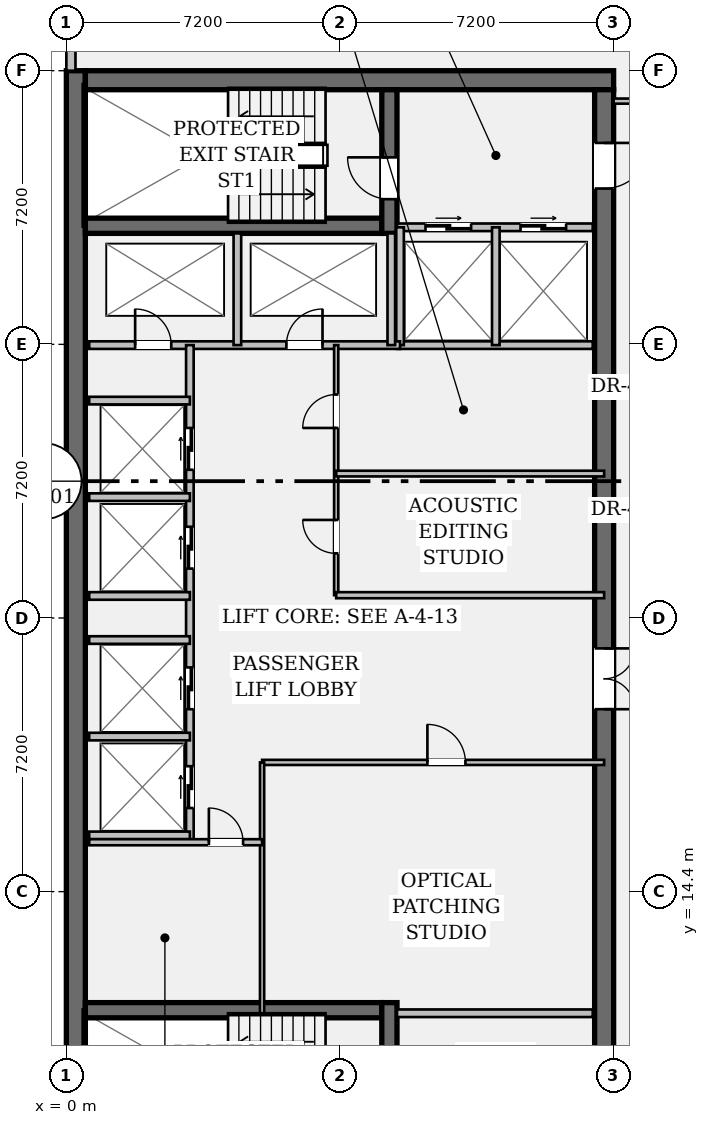
"""IFC4 building model, lengths in metres.
Left out: names, types, materials, properties, quantities, classifications, styles, units other than length and angle.
Written with IfcOpenShell. Run it as: python <this file> out.ifc"""

import sys

from ifc_helpers import new_model, si_unit, direction, frame, frame_2d, origin, place, context, subcontext, project, spatial, rectangle, extrude, element, fill, save


model = new_model("IFC4")
c1 = context("Model", 3, precision=1e-05, world=origin(), true_north=direction((0.0, 1.0)))
c2 = subcontext(c1, "Body", "Model", "MODEL_VIEW")
j1 = project(units=[si_unit("LENGTHUNIT", "METRE"), si_unit("PLANEANGLEUNIT", "RADIAN")], contexts=[c1])
p1 = place(None, origin())
s1 = spatial("IfcSite", under=j1, at=p1, CompositionType="ELEMENT")
p2 = place(p1, origin())
s2 = spatial("IfcBuilding", under=s1, at=p2, CompositionType="ELEMENT")
p3 = place(p2, frame((0.0, 0.0, 283.15)))
s3 = spatial("IfcBuildingStorey", under=s2, at=p3, CompositionType="ELEMENT", Elevation=283.15)
p4 = place(p3, frame((0.25, 7.2, 0.0), z_axis=(0.0, 0.0, 1.0), x_axis=(0.0, 1.0, 0.0)))
e1 = element("IfcWall", 1, at=p4, inside=s3, PredefinedType="SHEAR", context=c2, shape_type="SweptSolid", body=[
    extrude(rectangle(XDim=28.8, YDim=0.5, at=frame_2d((14.4, 0.0))), origin(), (0.0, 0.0, 1.0), 3.24),
])
p5 = place(p3, frame((0.5, 35.75, 0.0), z_axis=(0.0, 0.0, 1.0), x_axis=(1.0, 0.0, 0.0)))
e2 = element("IfcWall", 2, at=p5, inside=s3, PredefinedType="SHEAR", context=c2, shape_type="SweptSolid", body=[
    extrude(rectangle(XDim=13.9, YDim=0.5, at=frame_2d((6.95, 0.0))), origin(), (0.0, 0.0, 1.0), 3.24),
])
p6 = place(p3, frame((14.15, 35.5, 0.0), z_axis=(0.0, 0.0, 1.0), x_axis=(0.0, -1.0, 0.0)))
e3 = element("IfcWall", 3, at=p6, inside=s3, PredefinedType="SHEAR", context=c2, shape_type="SweptSolid", body=[
    extrude(rectangle(XDim=27.8, YDim=0.5, at=frame_2d((13.9, 0.0))), origin(), (0.0, 0.0, 1.0), 3.24),
])
p7 = place(p6, frame((1.4, 0.0, 0.0)))
e4 = element("IfcOpeningElement", 4, at=p7, cuts=e3, PredefinedType="OPENING", context=c2, shape_type="SweptSolid", body=[
    extrude(rectangle(XDim=1.2, YDim=2.15, at=frame_2d((0.6, 1.075))), frame((0.0, 0.262, 0.0), z_axis=(0.0, -1.0, 0.0), x_axis=(1.0, 0.0, 0.0)), (0.0, 0.0, 1.0), 0.524),
])
p8 = place(p6, frame((25.35, 0.0, 0.0)))
e5 = element("IfcOpeningElement", 5, at=p8, cuts=e3, PredefinedType="OPENING", context=c2, shape_type="SweptSolid", body=[
    extrude(rectangle(XDim=1.2, YDim=2.15, at=frame_2d((0.6, 1.075))), frame((0.0, 0.262, 0.0), z_axis=(0.0, -1.0, 0.0), x_axis=(1.0, 0.0, 0.0)), (0.0, 0.0, 1.0), 0.524),
])
p9 = place(p6, frame((14.7, 0.0, 0.0)))
e6 = element("IfcOpeningElement", 6, at=p9, cuts=e3, PredefinedType="OPENING", context=c2, shape_type="SweptSolid", body=[
    extrude(rectangle(XDim=1.6, YDim=2.2, at=frame_2d((0.8, 1.1))), frame((0.0, 0.262, 0.0), z_axis=(0.0, -1.0, 0.0), x_axis=(1.0, 0.0, 0.0)), (0.0, 0.0, 1.0), 0.524),
])
for number, where, z_axis, x_axis in (
    (7, (0.5, 31.92, 0.0), (0.0, 0.0, 1.0), (1.0, 0.0, 0.0)),
    (8, (0.5, 11.28, 0.0), (0.0, 0.0, 1.0), (1.0, 0.0, 0.0)),
):
    element("IfcWall", number, at=place(p3, frame(where, z_axis=z_axis, x_axis=x_axis)), inside=s3, PredefinedType="SHEAR", context=c2, shape_type="SweptSolid", body=[
        extrude(rectangle(XDim=7.8, YDim=0.4, at=frame_2d((3.9, 0.0))), origin(), (0.0, 0.0, 1.0), 3.24),
    ])
p10 = place(p3, frame((8.5, 31.72, 0.0), z_axis=(0.0, 0.0, 1.0), x_axis=(0.0, 1.0, 0.0)))
e9 = element("IfcWall", 9, at=p10, inside=s3, PredefinedType="SHEAR", context=c2, shape_type="SweptSolid", body=[
    extrude(rectangle(XDim=3.78, YDim=0.4, at=frame_2d((1.89, 0.0))), origin(), (0.0, 0.0, 1.0), 3.24),
])
p11 = place(p10, frame((0.9, 0.0, 0.0)))
e10 = element("IfcOpeningElement", 10, at=p11, cuts=e9, PredefinedType="OPENING", context=c2, shape_type="SweptSolid", body=[
    extrude(rectangle(XDim=1.1, YDim=2.15, at=frame_2d((0.55, 1.075))), frame((0.0, 0.212, 0.0), z_axis=(0.0, -1.0, 0.0), x_axis=(1.0, 0.0, 0.0)), (0.0, 0.0, 1.0), 0.424),
])
p12 = place(p3, frame((8.5, 7.7, 0.0), z_axis=(0.0, 0.0, 1.0), x_axis=(0.0, 1.0, 0.0)))
e11 = element("IfcWall", 11, at=p12, inside=s3, PredefinedType="SHEAR", context=c2, shape_type="SweptSolid", body=[
    extrude(rectangle(XDim=3.78, YDim=0.4, at=frame_2d((1.89, 0.0))), origin(), (0.0, 0.0, 1.0), 3.24),
])
p13 = place(p12, frame((0.85, 0.0, 0.0)))
e12 = element("IfcOpeningElement", 12, at=p13, cuts=e11, PredefinedType="OPENING", context=c2, shape_type="SweptSolid", body=[
    extrude(rectangle(XDim=1.1, YDim=2.15, at=frame_2d((0.55, 1.075))), frame((0.0, 0.212, 0.0), z_axis=(0.0, -1.0, 0.0), x_axis=(1.0, 0.0, 0.0)), (0.0, 0.0, 1.0), 0.424),
])
p14 = place(p3, frame((0.12, 36.0, 0.0), z_axis=(0.0, 0.0, 1.0), x_axis=(0.0, 1.0, 0.0)))
e13 = element("IfcWall", 13, at=p14, inside=s3, PredefinedType="STANDARD", context=c2, shape_type="SweptSolid", body=[
    extrude(rectangle(XDim=1.21, YDim=0.24, at=frame_2d((0.605, 0.0))), origin(), (0.0, 0.0, 1.0), 3.24),
])
p15 = place(p3, frame((8.7, 31.88, 0.0), z_axis=(0.0, 0.0, 1.0), x_axis=(1.0, 0.0, 0.0)))
e14 = element("IfcWall", 14, at=p15, inside=s3, PredefinedType="PARTITIONING", context=c2, shape_type="SweptSolid", body=[
    extrude(rectangle(XDim=5.15, YDim=0.2, at=frame_2d((2.575, 0.0))), origin(), (0.0, 0.0, 1.0), 3.24),
])
p16 = place(p15, frame((0.75, 0.0, 0.0)))
e15 = element("IfcOpeningElement", 15, at=p16, cuts=e14, PredefinedType="OPENING", context=c2, shape_type="SweptSolid", body=[
    extrude(rectangle(XDim=1.2, YDim=2.2, at=frame_2d((0.6, 1.1))), frame((0.0, 0.112, 0.0), z_axis=(0.0, -1.0, 0.0), x_axis=(1.0, 0.0, 0.0)), (0.0, 0.0, 1.0), 0.224),
])
p17 = place(p15, frame((3.25, 0.0, 0.0)))
e16 = element("IfcOpeningElement", 16, at=p17, cuts=e14, PredefinedType="OPENING", context=c2, shape_type="SweptSolid", body=[
    extrude(rectangle(XDim=1.2, YDim=2.2, at=frame_2d((0.6, 1.1))), frame((0.0, 0.112, 0.0), z_axis=(0.0, -1.0, 0.0), x_axis=(1.0, 0.0, 0.0)), (0.0, 0.0, 1.0), 0.224),
])
for number, where, z_axis, x_axis in (
    (17, (8.7, 11.2, 0.0), (0.0, 0.0, 1.0), (1.0, 0.0, 0.0)),
    (18, (8.7, 28.78, 0.0), (0.0, 0.0, 1.0), (1.0, 0.0, 0.0)),
):
    element("IfcWall", number, at=place(p3, frame(where, z_axis=z_axis, x_axis=x_axis)), inside=s3, PredefinedType="PARTITIONING", context=c2, shape_type="SweptSolid", body=[
        extrude(rectangle(XDim=5.15, YDim=0.2, at=frame_2d((2.575, 0.0))), origin(), (0.0, 0.0, 1.0), 3.24),
    ])
for number, where, z_axis, x_axis in (
    (19, (8.78, 28.78, 0.0), (0.0, 0.0, 1.0), (0.0, 1.0, 0.0)),
    (20, (11.3, 28.78, 0.0), (0.0, 0.0, 1.0), (0.0, 1.0, 0.0)),
):
    element("IfcWall", number, at=place(p3, frame(where, z_axis=z_axis, x_axis=x_axis)), inside=s3, PredefinedType="PARTITIONING", context=c2, shape_type="SweptSolid", body=[
        extrude(rectangle(XDim=3.1, YDim=0.2, at=frame_2d((1.55, 0.0))), origin(), (0.0, 0.0, 1.0), 3.24),
    ])
p18 = place(p3, frame((0.6, 28.78, 0.0), z_axis=(0.0, 0.0, 1.0), x_axis=(1.0, 0.0, 0.0)))
e21 = element("IfcWall", 21, at=p18, inside=s3, PredefinedType="PARTITIONING", context=c2, shape_type="SweptSolid", body=[
    extrude(rectangle(XDim=8.18, YDim=0.2, at=frame_2d((4.09, 0.0))), origin(), (0.0, 0.0, 1.0), 3.24),
])
p19 = place(p18, frame((1.21, 0.0, 0.0)))
e22 = element("IfcOpeningElement", 22, at=p19, cuts=e21, PredefinedType="OPENING", context=c2, shape_type="SweptSolid", body=[
    extrude(rectangle(XDim=0.95, YDim=2.15, at=frame_2d((0.475, 1.075))), frame((0.0, 0.112, 0.0), z_axis=(0.0, -1.0, 0.0), x_axis=(1.0, 0.0, 0.0)), (0.0, 0.0, 1.0), 0.224),
])
p20 = place(p18, frame((5.19, 0.0, 0.0)))
e23 = element("IfcOpeningElement", 23, at=p20, cuts=e21, PredefinedType="OPENING", context=c2, shape_type="SweptSolid", body=[
    extrude(rectangle(XDim=0.95, YDim=2.15, at=frame_2d((0.475, 1.075))), frame((0.0, 0.112, 0.0), z_axis=(0.0, -1.0, 0.0), x_axis=(1.0, 0.0, 0.0)), (0.0, 0.0, 1.0), 0.224),
])
for number, where, z_axis, x_axis in (
    (24, (4.5, 28.78, 0.0), (0.0, 0.0, 1.0), (0.0, 1.0, 0.0)),
    (25, (8.55, 28.78, 0.0), (0.0, 0.0, 1.0), (0.0, 1.0, 0.0)),
):
    element("IfcWall", number, at=place(p3, frame(where, z_axis=z_axis, x_axis=x_axis)), inside=s3, PredefinedType="PARTITIONING", context=c2, shape_type="SweptSolid", body=[
        extrude(rectangle(XDim=2.94, YDim=0.2, at=frame_2d((1.47, 0.0))), origin(), (0.0, 0.0, 1.0), 3.24),
    ])
p21 = place(p3, frame((3.25, 15.7, 0.0), z_axis=(0.0, 0.0, 1.0), x_axis=(0.0, 1.0, 0.0)))
e26 = element("IfcWall", 26, at=p21, inside=s3, PredefinedType="PARTITIONING", context=c2, shape_type="SweptSolid", body=[
    extrude(rectangle(XDim=13.08, YDim=0.2, at=frame_2d((6.54, 0.0))), origin(), (0.0, 0.0, 1.0), 3.24),
])
p22 = place(p21, frame((0.9, 0.0, 0.0)))
e27 = element("IfcOpeningElement", 27, at=p22, cuts=e26, PredefinedType="OPENING", context=c2, shape_type="SweptSolid", body=[
    extrude(rectangle(XDim=1.1, YDim=2.2, at=frame_2d((0.55, 1.1))), frame((0.0, 0.112, 0.0), z_axis=(0.0, -1.0, 0.0), x_axis=(1.0, 0.0, 0.0)), (0.0, 0.0, 1.0), 0.224),
])
p23 = place(p21, frame((3.5, 0.0, 0.0)))
e28 = element("IfcOpeningElement", 28, at=p23, cuts=e26, PredefinedType="OPENING", context=c2, shape_type="SweptSolid", body=[
    extrude(rectangle(XDim=1.1, YDim=2.2, at=frame_2d((0.55, 1.1))), frame((0.0, 0.112, 0.0), z_axis=(0.0, -1.0, 0.0), x_axis=(1.0, 0.0, 0.0)), (0.0, 0.0, 1.0), 0.224),
])
p24 = place(p21, frame((7.2, 0.0, 0.0)))
e29 = element("IfcOpeningElement", 29, at=p24, cuts=e26, PredefinedType="OPENING", context=c2, shape_type="SweptSolid", body=[
    extrude(rectangle(XDim=1.1, YDim=2.2, at=frame_2d((0.55, 1.1))), frame((0.0, 0.112, 0.0), z_axis=(0.0, -1.0, 0.0), x_axis=(1.0, 0.0, 0.0)), (0.0, 0.0, 1.0), 0.224),
])
p25 = place(p21, frame((9.8, 0.0, 0.0)))
e30 = element("IfcOpeningElement", 30, at=p25, cuts=e26, PredefinedType="OPENING", context=c2, shape_type="SweptSolid", body=[
    extrude(rectangle(XDim=1.1, YDim=2.2, at=frame_2d((0.55, 1.1))), frame((0.0, 0.112, 0.0), z_axis=(0.0, -1.0, 0.0), x_axis=(1.0, 0.0, 0.0)), (0.0, 0.0, 1.0), 0.224),
])
for number, where, z_axis, x_axis in (
    (31, (0.6, 15.88, 0.0), (0.0, 0.0, 1.0), (1.0, 0.0, 0.0)),
    (32, (0.6, 18.48, 0.0), (0.0, 0.0, 1.0), (1.0, 0.0, 0.0)),
    (33, (0.6, 22.18, 0.0), (0.0, 0.0, 1.0), (1.0, 0.0, 0.0)),
    (34, (0.6, 24.78, 0.0), (0.0, 0.0, 1.0), (1.0, 0.0, 0.0)),
    (35, (0.6, 21.02, 0.0), (0.0, 0.0, 1.0), (1.0, 0.0, 0.0)),
    (36, (0.6, 27.32, 0.0), (0.0, 0.0, 1.0), (1.0, 0.0, 0.0)),
):
    element("IfcWall", number, at=place(p3, frame(where, z_axis=z_axis, x_axis=x_axis)), inside=s3, PredefinedType="PARTITIONING", context=c2, shape_type="SweptSolid", body=[
        extrude(rectangle(XDim=2.65, YDim=0.2, at=frame_2d((1.325, 0.0))), origin(), (0.0, 0.0, 1.0), 3.24),
    ])
p26 = place(p3, frame((7.1, 22.2, 0.0), z_axis=(0.0, 0.0, 1.0), x_axis=(0.0, 1.0, 0.0)))
e37 = element("IfcWall", 37, at=p26, inside=s3, PredefinedType="PARTITIONING", context=c2, shape_type="SweptSolid", body=[
    extrude(rectangle(XDim=6.58, YDim=0.11, at=frame_2d((3.29, 0.0))), origin(), (0.0, 0.0, 1.0), 3.24),
])
p27 = place(p26, frame((1.1, 0.0, 0.0)))
e38 = element("IfcOpeningElement", 38, at=p27, cuts=e37, PredefinedType="OPENING", context=c2, shape_type="SweptSolid", body=[
    extrude(rectangle(XDim=0.88, YDim=2.15, at=frame_2d((0.44, 1.075))), frame((0.0, 0.067, 0.0), z_axis=(0.0, -1.0, 0.0), x_axis=(1.0, 0.0, 0.0)), (0.0, 0.0, 1.0), 0.134),
])
p28 = place(p26, frame((4.4, 0.0, 0.0)))
e39 = element("IfcOpeningElement", 39, at=p28, cuts=e37, PredefinedType="OPENING", context=c2, shape_type="SweptSolid", body=[
    extrude(rectangle(XDim=0.88, YDim=2.15, at=frame_2d((0.44, 1.075))), frame((0.0, 0.067, 0.0), z_axis=(0.0, -1.0, 0.0), x_axis=(1.0, 0.0, 0.0)), (0.0, 0.0, 1.0), 0.134),
])
p29 = place(p3, frame((7.1, 22.2, 0.0), z_axis=(0.0, 0.0, 1.0), x_axis=(1.0, 0.0, 0.0)))
e40 = element("IfcWall", 40, at=p29, inside=s3, PredefinedType="PARTITIONING", context=c2, shape_type="SweptSolid", body=[
    extrude(rectangle(XDim=7.05, YDim=0.16, at=frame_2d((3.525, 0.0))), origin(), (0.0, 0.0, 1.0), 3.24),
])
p30 = place(p3, frame((7.1, 25.4, 0.0), z_axis=(0.0, 0.0, 1.0), x_axis=(1.0, 0.0, 0.0)))
e41 = element("IfcWall", 41, at=p30, inside=s3, PredefinedType="PARTITIONING", context=c2, shape_type="SweptSolid", body=[
    extrude(rectangle(XDim=7.05, YDim=0.15, at=frame_2d((3.525, 0.0))), origin(), (0.0, 0.0, 1.0), 3.24),
])
p31 = place(p3, frame((5.15, 17.8, 0.0), z_axis=(0.0, 0.0, 1.0), x_axis=(1.0, 0.0, 0.0)))
e42 = element("IfcWall", 42, at=p31, inside=s3, PredefinedType="PARTITIONING", context=c2, shape_type="SweptSolid", body=[
    extrude(rectangle(XDim=9.0, YDim=0.135, at=frame_2d((4.5, 0.0))), origin(), (0.0, 0.0, 1.0), 3.24),
])
p32 = place(p31, frame((4.35, 0.0, 0.0)))
e43 = element("IfcOpeningElement", 43, at=p32, cuts=e42, PredefinedType="OPENING", context=c2, shape_type="SweptSolid", body=[
    extrude(rectangle(XDim=1.0, YDim=2.15, at=frame_2d((0.5, 1.075))), frame((0.0, 0.08, 0.0), z_axis=(0.0, -1.0, 0.0), x_axis=(1.0, 0.0, 0.0)), (0.0, 0.0, 1.0), 0.159),
])
p33 = place(p3, frame((5.15, 11.2, 0.0), z_axis=(0.0, 0.0, 1.0), x_axis=(0.0, 1.0, 0.0)))
e44 = element("IfcWall", 44, at=p33, inside=s3, PredefinedType="PARTITIONING", context=c2, shape_type="SweptSolid", body=[
    extrude(rectangle(XDim=6.6, YDim=0.11, at=frame_2d((3.3, 0.0))), origin(), (0.0, 0.0, 1.0), 3.24),
])
p34 = place(p3, frame((0.6, 15.7, 0.0), z_axis=(0.0, 0.0, 1.0), x_axis=(1.0, 0.0, 0.0)))
e45 = element("IfcWall", 45, at=p34, inside=s3, PredefinedType="PARTITIONING", context=c2, shape_type="SweptSolid", body=[
    extrude(rectangle(XDim=4.55, YDim=0.16, at=frame_2d((2.275, 0.0))), origin(), (0.0, 0.0, 1.0), 3.24),
])
p35 = place(p34, frame((3.15, 0.0, 0.0)))
e46 = element("IfcOpeningElement", 46, at=p35, cuts=e45, PredefinedType="OPENING", context=c2, shape_type="SweptSolid", body=[
    extrude(rectangle(XDim=0.9, YDim=2.15, at=frame_2d((0.45, 1.075))), frame((0.0, 0.092, 0.0), z_axis=(0.0, -1.0, 0.0), x_axis=(1.0, 0.0, 0.0)), (0.0, 0.0, 1.0), 0.184),
])
p36 = place(p3, frame((14.4, 35.2, 0.0), z_axis=(0.0, 0.0, 1.0), x_axis=(1.0, 0.0, 0.0)))
e47 = element("IfcWall", 47, at=p36, inside=s3, PredefinedType="PARTITIONING", context=c2, shape_type="SweptSolid", body=[
    extrude(rectangle(XDim=2.95, YDim=0.135, at=frame_2d((1.475, 0.0))), origin(), (0.0, 0.0, 1.0), 2.808),
])
p37 = place(p36, frame((0.95, 0.0, 0.0)))
e48 = element("IfcOpeningElement", 48, at=p37, cuts=e47, PredefinedType="OPENING", context=c2, shape_type="SweptSolid", body=[
    extrude(rectangle(XDim=1.0, YDim=2.15, at=frame_2d((0.5, 1.075))), frame((0.0, 0.08, 0.0), z_axis=(0.0, -1.0, 0.0), x_axis=(1.0, 0.0, 0.0)), (0.0, 0.0, 1.0), 0.159),
])
p38 = place(p11, origin())
e49 = element("IfcDoor", 49, at=p38, inside=s3, OperationType="SINGLE_SWING_RIGHT", PredefinedType="DOOR", context=c2, shape_type="SweptSolid", body=[
    extrude(rectangle(XDim=1.1, YDim=2.15, at=frame_2d((0.55, 1.075))), frame((0.0, 0.025, 0.0), z_axis=(0.0, -1.0, 0.0), x_axis=(1.0, 0.0, 0.0)), (0.0, 0.0, 1.0), 0.05),
])
fill(e10, e49)
p39 = place(p7, origin())
e50 = element("IfcDoor", 50, at=p39, inside=s3, OperationType="SINGLE_SWING_LEFT", PredefinedType="DOOR", context=c2, shape_type="SweptSolid", body=[
    extrude(rectangle(XDim=1.2, YDim=2.15, at=frame_2d((0.6, 1.075))), frame((0.0, 0.025, 0.0), z_axis=(0.0, -1.0, 0.0), x_axis=(1.0, 0.0, 0.0)), (0.0, 0.0, 1.0), 0.05),
])
fill(e4, e50)
p40 = place(p16, origin())
e51 = element("IfcDoor", 51, at=p40, inside=s3, OperationType="DOUBLE_DOOR_SLIDING", PredefinedType="DOOR", context=c2, shape_type="SweptSolid", body=[
    extrude(rectangle(XDim=1.2, YDim=2.2, at=frame_2d((0.6, 1.1))), frame((0.0, 0.025, 0.0), z_axis=(0.0, -1.0, 0.0), x_axis=(1.0, 0.0, 0.0)), (0.0, 0.0, 1.0), 0.05),
])
fill(e15, e51)
p41 = place(p17, origin())
e52 = element("IfcDoor", 52, at=p41, inside=s3, OperationType="DOUBLE_DOOR_SLIDING", PredefinedType="DOOR", context=c2, shape_type="SweptSolid", body=[
    extrude(rectangle(XDim=1.2, YDim=2.2, at=frame_2d((0.6, 1.1))), frame((0.0, 0.025, 0.0), z_axis=(0.0, -1.0, 0.0), x_axis=(1.0, 0.0, 0.0)), (0.0, 0.0, 1.0), 0.05),
])
fill(e16, e52)
p42 = place(p19, origin())
e53 = element("IfcDoor", 53, at=p42, inside=s3, OperationType="SINGLE_SWING_LEFT", PredefinedType="DOOR", context=c2, shape_type="SweptSolid", body=[
    extrude(rectangle(XDim=0.95, YDim=2.15, at=frame_2d((0.475, 1.075))), frame((0.0, 0.025, 0.0), z_axis=(0.0, -1.0, 0.0), x_axis=(1.0, 0.0, 0.0)), (0.0, 0.0, 1.0), 0.05),
])
fill(e22, e53)
p43 = place(p20, origin())
e54 = element("IfcDoor", 54, at=p43, inside=s3, OperationType="SINGLE_SWING_RIGHT", PredefinedType="DOOR", context=c2, shape_type="SweptSolid", body=[
    extrude(rectangle(XDim=0.95, YDim=2.15, at=frame_2d((0.475, 1.075))), frame((0.0, 0.025, 0.0), z_axis=(0.0, -1.0, 0.0), x_axis=(1.0, 0.0, 0.0)), (0.0, 0.0, 1.0), 0.05),
])
fill(e23, e54)
p44 = place(p9, origin())
e55 = element("IfcDoor", 55, at=p44, inside=s3, OperationType="DOUBLE_DOOR_SINGLE_SWING", PredefinedType="DOOR", context=c2, shape_type="SweptSolid", body=[
    extrude(rectangle(XDim=1.6, YDim=2.2, at=frame_2d((0.8, 1.1))), frame((0.0, 0.025, 0.0), z_axis=(0.0, -1.0, 0.0), x_axis=(1.0, 0.0, 0.0)), (0.0, 0.0, 1.0), 0.05),
])
fill(e6, e55)
p45 = place(p22, origin())
e56 = element("IfcDoor", 56, at=p45, inside=s3, OperationType="DOUBLE_DOOR_SLIDING", PredefinedType="DOOR", context=c2, shape_type="SweptSolid", body=[
    extrude(rectangle(XDim=1.1, YDim=2.2, at=frame_2d((0.55, 1.1))), frame((0.0, 0.025, 0.0), z_axis=(0.0, -1.0, 0.0), x_axis=(1.0, 0.0, 0.0)), (0.0, 0.0, 1.0), 0.05),
])
fill(e27, e56)
p46 = place(p23, origin())
e57 = element("IfcDoor", 57, at=p46, inside=s3, OperationType="DOUBLE_DOOR_SLIDING", PredefinedType="DOOR", context=c2, shape_type="SweptSolid", body=[
    extrude(rectangle(XDim=1.1, YDim=2.2, at=frame_2d((0.55, 1.1))), frame((0.0, 0.025, 0.0), z_axis=(0.0, -1.0, 0.0), x_axis=(1.0, 0.0, 0.0)), (0.0, 0.0, 1.0), 0.05),
])
fill(e28, e57)
p47 = place(p24, origin())
e58 = element("IfcDoor", 58, at=p47, inside=s3, OperationType="DOUBLE_DOOR_SLIDING", PredefinedType="DOOR", context=c2, shape_type="SweptSolid", body=[
    extrude(rectangle(XDim=1.1, YDim=2.2, at=frame_2d((0.55, 1.1))), frame((0.0, 0.025, 0.0), z_axis=(0.0, -1.0, 0.0), x_axis=(1.0, 0.0, 0.0)), (0.0, 0.0, 1.0), 0.05),
])
fill(e29, e58)
p48 = place(p25, origin())
e59 = element("IfcDoor", 59, at=p48, inside=s3, OperationType="DOUBLE_DOOR_SLIDING", PredefinedType="DOOR", context=c2, shape_type="SweptSolid", body=[
    extrude(rectangle(XDim=1.1, YDim=2.2, at=frame_2d((0.55, 1.1))), frame((0.0, 0.025, 0.0), z_axis=(0.0, -1.0, 0.0), x_axis=(1.0, 0.0, 0.0)), (0.0, 0.0, 1.0), 0.05),
])
fill(e30, e59)
p49 = place(p27, origin())
e60 = element("IfcDoor", 60, at=p49, inside=s3, OperationType="SINGLE_SWING_RIGHT", PredefinedType="DOOR", context=c2, shape_type="SweptSolid", body=[
    extrude(rectangle(XDim=0.88, YDim=2.15, at=frame_2d((0.44, 1.075))), frame((0.0, 0.025, 0.0), z_axis=(0.0, -1.0, 0.0), x_axis=(1.0, 0.0, 0.0)), (0.0, 0.0, 1.0), 0.05),
])
fill(e38, e60)
p50 = place(p28, origin())
e61 = element("IfcDoor", 61, at=p50, inside=s3, OperationType="SINGLE_SWING_LEFT", PredefinedType="DOOR", context=c2, shape_type="SweptSolid", body=[
    extrude(rectangle(XDim=0.88, YDim=2.15, at=frame_2d((0.44, 1.075))), frame((0.0, 0.025, 0.0), z_axis=(0.0, -1.0, 0.0), x_axis=(1.0, 0.0, 0.0)), (0.0, 0.0, 1.0), 0.05),
])
fill(e39, e61)
p51 = place(p32, origin())
e62 = element("IfcDoor", 62, at=p51, inside=s3, OperationType="SINGLE_SWING_LEFT", PredefinedType="DOOR", context=c2, shape_type="SweptSolid", body=[
    extrude(rectangle(XDim=1.0, YDim=2.15, at=frame_2d((0.5, 1.075))), frame((0.0, 0.025, 0.0), z_axis=(0.0, -1.0, 0.0), x_axis=(1.0, 0.0, 0.0)), (0.0, 0.0, 1.0), 0.05),
])
fill(e43, e62)
p52 = place(p35, origin())
e63 = element("IfcDoor", 63, at=p52, inside=s3, OperationType="SINGLE_SWING_LEFT", PredefinedType="DOOR", context=c2, shape_type="SweptSolid", body=[
    extrude(rectangle(XDim=0.9, YDim=2.15, at=frame_2d((0.45, 1.075))), frame((0.0, 0.025, 0.0), z_axis=(0.0, -1.0, 0.0), x_axis=(1.0, 0.0, 0.0)), (0.0, 0.0, 1.0), 0.05),
])
fill(e46, e63)
save(model, sys.argv[1])
